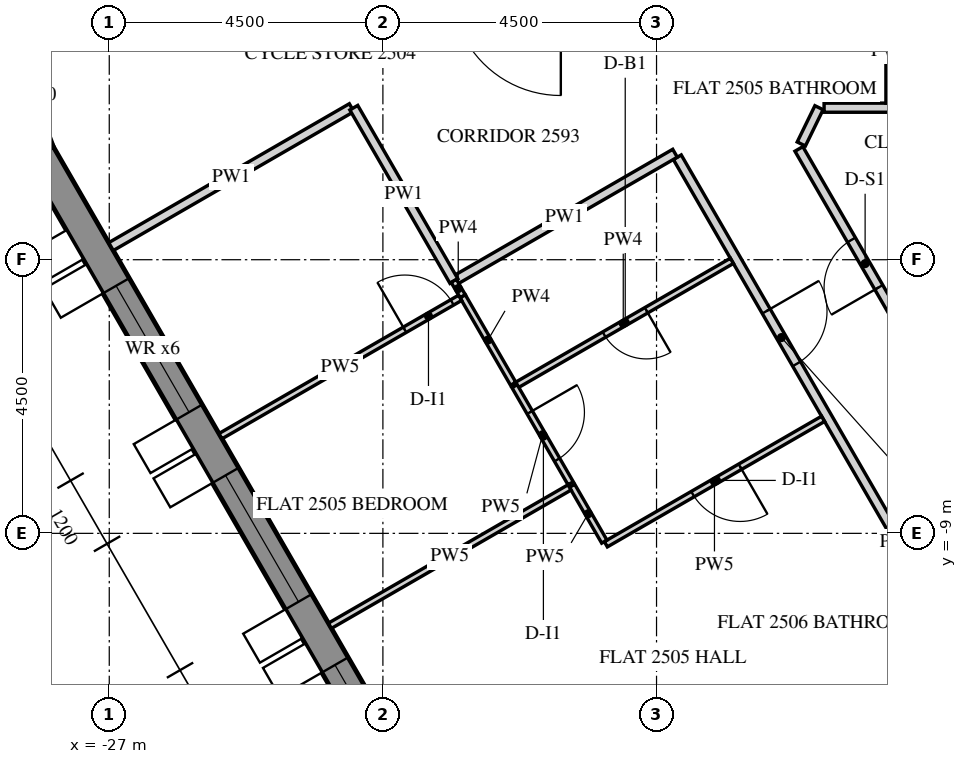
"""IFC4 building model, lengths in metres.
Left out: names, types, materials, properties, quantities, classifications, styles, units other than length and angle.
Written with IfcOpenShell. Run it as: python <this file> out.ifc"""

import sys

from ifc_helpers import new_model, si_unit, direction, frame, frame_2d, origin, place, context, subcontext, project, spatial, polyline, rectangle, outline, extrude, element, fill, save


model = new_model("IFC4")
c1 = context("Model", 3, precision=1e-05, world=origin(), true_north=direction((0.0, 1.0)))
c2 = subcontext(c1, "Body", "Model", "MODEL_VIEW")
j1 = project(units=[si_unit("LENGTHUNIT", "METRE"), si_unit("PLANEANGLEUNIT", "RADIAN")], contexts=[c1])
p1 = place(None, origin())
s1 = spatial("IfcSite", under=j1, at=p1, CompositionType="ELEMENT")
p2 = place(p1, origin())
s2 = spatial("IfcBuilding", under=s1, at=p2, CompositionType="ELEMENT")
p3 = place(p2, frame((0.0, 0.0, 314.7)))
s3 = spatial("IfcBuildingStorey", under=s2, at=p3, CompositionType="ELEMENT", Elevation=314.7)
p4 = place(p3, frame((-28.578, -1.606, -0.15), z_axis=(0.0, 0.0, 1.0), x_axis=(0.352838463023, -0.935684251771, 0.0)))
e1 = element("IfcWall", 1, at=p4, inside=s3, PredefinedType="SOLIDWALL", context=c2, shape_type="SweptSolid", body=[
    extrude(outline(polyline([(-0.041, -0.25), (1.237, -0.25), (1.196, 0.25), (0.041, 0.25), (-0.041, -0.25)])), origin(), (0.0, 0.0, 1.0), 3.9),
])
p5 = place(p3, frame((-28.149, -2.745, -0.15), z_axis=(0.0, 0.0, 1.0), x_axis=(0.500003737743, -0.866023245787, 0.0)))
e2 = element("IfcWall", 2, at=p5, inside=s3, PredefinedType="SOLIDWALL", context=c2, shape_type="SweptSolid", body=[
    extrude(outline(polyline([(-0.021, -0.25), (25.468, -0.25), (25.421, 0.25), (0.021, 0.25), (-0.021, -0.25)])), origin(), (0.0, 0.0, 1.0), 3.9),
])
p6 = place(p5, frame((2.522, 0.0, 0.75)))
e3 = element("IfcOpeningElement", 3, at=p6, cuts=e2, PredefinedType="OPENING", context=c2, shape_type="SweptSolid", body=[
    extrude(rectangle(XDim=2.4, YDim=2.7, at=frame_2d((1.2, 1.35))), frame((0.0, 0.26, 0.0), z_axis=(0.0, -1.0, 0.0), x_axis=(1.0, 0.0, 0.0)), (0.0, 0.0, 1.0), 0.52),
])
p7 = place(p5, frame((6.122, 0.0, 0.75)))
e4 = element("IfcOpeningElement", 4, at=p7, cuts=e2, PredefinedType="OPENING", context=c2, shape_type="SweptSolid", body=[
    extrude(rectangle(XDim=2.4, YDim=2.7, at=frame_2d((1.2, 1.35))), frame((0.0, 0.26, 0.0), z_axis=(0.0, -1.0, 0.0), x_axis=(1.0, 0.0, 0.0)), (0.0, 0.0, 1.0), 0.52),
])
p8 = place(p5, frame((9.722, 0.0, 0.75)))
e5 = element("IfcOpeningElement", 5, at=p8, cuts=e2, PredefinedType="OPENING", context=c2, shape_type="SweptSolid", body=[
    extrude(rectangle(XDim=2.4, YDim=2.7, at=frame_2d((1.2, 1.35))), frame((0.0, 0.26, 0.0), z_axis=(0.0, -1.0, 0.0), x_axis=(1.0, 0.0, 0.0)), (0.0, 0.0, 1.0), 0.52),
])
p9 = place(p5, frame((13.323, 0.0, 0.75)))
e6 = element("IfcOpeningElement", 6, at=p9, cuts=e2, PredefinedType="OPENING", context=c2, shape_type="SweptSolid", body=[
    extrude(rectangle(XDim=2.4, YDim=2.7, at=frame_2d((1.2, 1.35))), frame((0.0, 0.26, 0.0), z_axis=(0.0, -1.0, 0.0), x_axis=(1.0, 0.0, 0.0)), (0.0, 0.0, 1.0), 0.52),
])
p10 = place(p5, frame((16.922, 0.0, 0.75)))
e7 = element("IfcOpeningElement", 7, at=p10, cuts=e2, PredefinedType="OPENING", context=c2, shape_type="SweptSolid", body=[
    extrude(rectangle(XDim=2.4, YDim=2.7, at=frame_2d((1.2, 1.35))), frame((0.0, 0.26, 0.0), z_axis=(0.0, -1.0, 0.0), x_axis=(1.0, 0.0, 0.0)), (0.0, 0.0, 1.0), 0.52),
])
p11 = place(p5, frame((20.522, 0.0, 0.75)))
e8 = element("IfcOpeningElement", 8, at=p11, cuts=e2, PredefinedType="OPENING", context=c2, shape_type="SweptSolid", body=[
    extrude(rectangle(XDim=2.4, YDim=2.7, at=frame_2d((1.2, 1.35))), frame((0.0, 0.26, 0.0), z_axis=(0.0, -1.0, 0.0), x_axis=(1.0, 0.0, 0.0)), (0.0, 0.0, 1.0), 0.52),
])
p12 = place(p3, frame((-17.659, -2.814, 0.0), z_axis=(0.0, 0.0, 1.0), x_axis=(0.499992611149, -0.866029669697, 0.0)))
e9 = element("IfcWall", 9, at=p12, inside=s3, PredefinedType="PARTITIONING", context=c2, shape_type="SweptSolid", body=[
    extrude(rectangle(XDim=14.602, YDim=0.15, at=frame_2d((7.301, 0.0))), origin(), (0.0, 0.0, 1.0), 2.988),
])
p13 = place(p12, frame((2.925, 0.0, 0.0)))
e10 = element("IfcOpeningElement", 10, at=p13, cuts=e9, PredefinedType="OPENING", context=c2, shape_type="SweptSolid", body=[
    extrude(rectangle(XDim=1.0, YDim=2.1, at=frame_2d((0.5, 1.05))), frame((0.0, 0.085, 0.0), z_axis=(0.0, -1.0, 0.0), x_axis=(1.0, 0.0, 0.0)), (0.0, 0.0, 1.0), 0.17),
])
p14 = place(p12, frame((13.452, 0.0, 0.0)))
e11 = element("IfcOpeningElement", 11, at=p14, cuts=e9, PredefinedType="OPENING", context=c2, shape_type="SweptSolid", body=[
    extrude(rectangle(XDim=1.0, YDim=2.1, at=frame_2d((0.5, 1.05))), frame((0.0, 0.085, 0.0), z_axis=(0.0, -1.0, 0.0), x_axis=(1.0, 0.0, 0.0)), (0.0, 0.0, 1.0), 0.17),
])
p15 = place(p3, frame((-21.333, -4.849, 0.0), z_axis=(0.0, 0.0, 1.0), x_axis=(0.866009402589, 0.500027713859, 0.0)))
e12 = element("IfcWall", 12, at=p15, inside=s3, PredefinedType="PARTITIONING", context=c2, shape_type="SweptSolid", body=[
    extrude(rectangle(XDim=4.2, YDim=0.15, at=frame_2d((2.1, 0.0))), origin(), (0.0, 0.0, 1.0), 2.988),
])
p16 = place(p3, frame((-26.971, -4.284, 0.0), z_axis=(0.0, 0.0, 1.0), x_axis=(0.866028083473, 0.499995358614, 0.0)))
e13 = element("IfcWall", 13, at=p16, inside=s3, PredefinedType="PARTITIONING", context=c2, shape_type="SweptSolid", body=[
    extrude(rectangle(XDim=4.569, YDim=0.15, at=frame_2d((2.284, 0.0))), origin(), (0.0, 0.0, 1.0), 2.988),
])
p17 = place(p3, frame((-22.979, -2.0, 0.0), z_axis=(0.0, 0.0, 1.0), x_axis=(0.499989815132, -0.866031283941, 0.0)))
e14 = element("IfcWall", 14, at=p17, inside=s3, PredefinedType="PARTITIONING", context=c2, shape_type="SweptSolid", body=[
    extrude(rectangle(XDim=3.293, YDim=0.15, at=frame_2d((1.647, 0.0))), origin(), (0.0, 0.0, 1.0), 2.988),
])
p18 = place(p3, frame((-13.481, -6.451, 0.0), z_axis=(0.0, 0.0, 1.0), x_axis=(-0.499990905326, 0.866030654533, 0.0)))
e15 = element("IfcWall", 15, at=p18, inside=s3, PredefinedType="PARTITIONING", context=c2, shape_type="SweptSolid", body=[
    extrude(rectangle(XDim=4.356, YDim=0.15, at=frame_2d((2.178, 0.0))), origin(), (0.0, 0.0, 1.0), 2.988),
])
p19 = place(p18, frame((1.728, 0.0, 0.0)))
e16 = element("IfcOpeningElement", 16, at=p19, cuts=e15, PredefinedType="OPENING", context=c2, shape_type="SweptSolid", body=[
    extrude(rectangle(XDim=0.9, YDim=2.1, at=frame_2d((0.45, 1.05))), frame((0.0, 0.085, 0.0), z_axis=(0.0, -1.0, 0.0), x_axis=(1.0, 0.0, 0.0)), (0.0, 0.0, 1.0), 0.17),
])
p20 = place(p3, frame((-15.619, -2.597, 0.0), z_axis=(0.0, 0.0, 1.0), x_axis=(0.438220812173, 0.898867353828, 0.0)))
e17 = element("IfcWall", 17, at=p20, inside=s3, PredefinedType="PARTITIONING", context=c2, shape_type="SweptSolid", body=[
    extrude(rectangle(XDim=0.664, YDim=0.15, at=frame_2d((0.332, 0.0))), origin(), (0.0, 0.0, 1.0), 2.988),
])
p21 = place(p3, frame((-15.245, -2.0, 0.0), z_axis=(0.0, 0.0, 1.0), x_axis=(1.0, 0.0, 0.0)))
e18 = element("IfcWall", 18, at=p21, inside=s3, PredefinedType="PARTITIONING", context=c2, shape_type="SweptSolid", body=[
    extrude(rectangle(XDim=1.092, YDim=0.15, at=frame_2d((0.546, 0.0))), origin(), (0.0, 0.0, 1.0), 2.988),
])
p22 = place(p3, frame((-14.153, -1.925, 0.0), z_axis=(0.0, 0.0, 1.0), x_axis=(0.0, 1.0, 0.0)))
e19 = element("IfcWall", 19, at=p22, inside=s3, PredefinedType="PARTITIONING", context=c2, shape_type="SweptSolid", body=[
    extrude(rectangle(XDim=1.725, YDim=0.15, at=frame_2d((0.863, 0.0))), origin(), (0.0, 0.0, 1.0), 2.988),
])
p23 = place(p3, frame((-15.261, -7.117, 0.0), z_axis=(0.0, 0.0, 1.0), x_axis=(-0.866019999656, -0.500009360108, 0.0)))
e20 = element("IfcWall", 20, at=p23, inside=s3, PredefinedType="PARTITIONING", context=c2, shape_type="SweptSolid", body=[
    extrude(rectangle(XDim=4.125, YDim=0.1, at=frame_2d((2.062, 0.0))), origin(), (0.0, 0.0, 1.0), 2.988),
])
p24 = place(p23, frame((1.575, 0.0, 0.0)))
e21 = element("IfcOpeningElement", 21, at=p24, cuts=e20, PredefinedType="OPENING", context=c2, shape_type="SweptSolid", body=[
    extrude(rectangle(XDim=0.9, YDim=2.1, at=frame_2d((0.45, 1.05))), frame((0.0, 0.06, 0.0), z_axis=(0.0, -1.0, 0.0), x_axis=(1.0, 0.0, 0.0)), (0.0, 0.0, 1.0), 0.12),
])
p25 = place(p3, frame((-18.858, -9.136, 0.0), z_axis=(0.0, 0.0, 1.0), x_axis=(-0.499928435111, 0.86606671785, 0.0)))
e22 = element("IfcWall", 22, at=p25, inside=s3, PredefinedType="PARTITIONING", context=c2, shape_type="SweptSolid", body=[
    extrude(rectangle(XDim=1.06, YDim=0.1, at=frame_2d((0.53, 0.0))), origin(), (0.0, 0.0, 1.0), 2.988),
])
p26 = place(p3, frame((-19.431, -8.245, 0.0), z_axis=(0.0, 0.0, 1.0), x_axis=(-0.866035472144, -0.499982560684, 0.0)))
e23 = element("IfcWall", 23, at=p26, inside=s3, PredefinedType="PARTITIONING", context=c2, shape_type="SweptSolid", body=[
    extrude(rectangle(XDim=4.55, YDim=0.1, at=frame_2d((2.275, 0.0))), origin(), (0.0, 0.0, 1.0), 2.988),
])
p27 = place(p3, frame((-16.761, -4.519, 0.0), z_axis=(0.0, 0.0, 1.0), x_axis=(-0.866019999656, -0.500009360108, 0.0)))
e24 = element("IfcWall", 24, at=p27, inside=s3, PredefinedType="PARTITIONING", context=c2, shape_type="SweptSolid", body=[
    extrude(rectangle(XDim=4.125, YDim=0.1, at=frame_2d((2.062, 0.0))), origin(), (0.0, 0.0, 1.0), 2.988),
])
p28 = place(p27, frame((1.625, 0.0, 0.0)))
e25 = element("IfcOpeningElement", 25, at=p28, cuts=e24, PredefinedType="OPENING", context=c2, shape_type="SweptSolid", body=[
    extrude(rectangle(XDim=0.8, YDim=2.1, at=frame_2d((0.4, 1.05))), frame((0.0, 0.06, 0.0), z_axis=(0.0, -1.0, 0.0), x_axis=(1.0, 0.0, 0.0)), (0.0, 0.0, 1.0), 0.12),
])
p29 = place(p3, frame((-20.334, -6.58, 0.0), z_axis=(0.0, 0.0, 1.0), x_axis=(0.499955500775, -0.8660510939, 0.0)))
e26 = element("IfcWall", 26, at=p29, inside=s3, PredefinedType="PARTITIONING", context=c2, shape_type="SweptSolid", body=[
    extrude(rectangle(XDim=1.844, YDim=0.1, at=frame_2d((0.922, 0.0))), origin(), (0.0, 0.0, 1.0), 2.988),
])
p30 = place(p29, frame((0.498, 0.0, 0.0)))
e27 = element("IfcOpeningElement", 27, at=p30, cuts=e26, PredefinedType="OPENING", context=c2, shape_type="SweptSolid", body=[
    extrude(rectangle(XDim=0.9, YDim=2.1, at=frame_2d((0.45, 1.05))), frame((0.0, 0.06, 0.0), z_axis=(0.0, -1.0, 0.0), x_axis=(1.0, 0.0, 0.0)), (0.0, 0.0, 1.0), 0.12),
])
p31 = place(p3, frame((-21.334, -4.848, 0.0), z_axis=(0.0, 0.0, 1.0), x_axis=(0.500249908544, -0.865881070934, 0.0)))
e28 = element("IfcWall", 28, at=p31, inside=s3, PredefinedType="PARTITIONING", context=c2, shape_type="SweptSolid", body=[
    extrude(rectangle(XDim=0.294, YDim=0.1, at=frame_2d((0.147, 0.0))), origin(), (0.0, 0.0, 1.0), 2.988),
])
p32 = place(p3, frame((-21.188, -5.102, 0.0), z_axis=(0.0, 0.0, 1.0), x_axis=(0.499998264499, -0.866026405774, 0.0)))
e29 = element("IfcWall", 29, at=p32, inside=s3, PredefinedType="PARTITIONING", context=c2, shape_type="SweptSolid", body=[
    extrude(rectangle(XDim=1.66, YDim=0.1, at=frame_2d((0.83, 0.0))), origin(), (0.0, 0.0, 1.0), 2.988),
])
p33 = place(p3, frame((-25.171, -7.402, 0.0), z_axis=(0.0, 0.0, 1.0), x_axis=(0.866022057717, 0.500005795514, 0.0)))
e30 = element("IfcWall", 30, at=p33, inside=s3, PredefinedType="PARTITIONING", context=c2, shape_type="SweptSolid", body=[
    extrude(rectangle(XDim=4.55, YDim=0.1, at=frame_2d((2.275, 0.0))), origin(), (0.0, 0.0, 1.0), 2.988),
])
p34 = place(p33, frame((3.5, 0.0, 0.0)))
e31 = element("IfcOpeningElement", 31, at=p34, cuts=e30, PredefinedType="OPENING", context=c2, shape_type="SweptSolid", body=[
    extrude(rectangle(XDim=0.9, YDim=2.1, at=frame_2d((0.45, 1.05))), frame((0.0, 0.06, 0.0), z_axis=(0.0, -1.0, 0.0), x_axis=(1.0, 0.0, 0.0)), (0.0, 0.0, 1.0), 0.12),
])
p35 = place(p6, frame((0.0, 0.18, 0.0)))
e32 = element("IfcWindow", 32, at=p35, inside=s3, PartitioningType="DOUBLE_PANEL_VERTICAL", PredefinedType="WINDOW", context=c2, shape_type="SweptSolid", body=[
    extrude(rectangle(XDim=2.4, YDim=2.7, at=frame_2d((1.2, 1.35))), frame((0.0, 0.03, 0.0), z_axis=(0.0, -1.0, 0.0), x_axis=(1.0, 0.0, 0.0)), (0.0, 0.0, 1.0), 0.06),
])
fill(e3, e32)
p36 = place(p7, frame((0.0, 0.18, 0.0)))
e33 = element("IfcWindow", 33, at=p36, inside=s3, PartitioningType="DOUBLE_PANEL_VERTICAL", PredefinedType="WINDOW", context=c2, shape_type="SweptSolid", body=[
    extrude(rectangle(XDim=2.4, YDim=2.7, at=frame_2d((1.2, 1.35))), frame((0.0, 0.03, 0.0), z_axis=(0.0, -1.0, 0.0), x_axis=(1.0, 0.0, 0.0)), (0.0, 0.0, 1.0), 0.06),
])
fill(e4, e33)
p37 = place(p8, frame((0.0, 0.18, 0.0)))
e34 = element("IfcWindow", 34, at=p37, inside=s3, PartitioningType="DOUBLE_PANEL_VERTICAL", PredefinedType="WINDOW", context=c2, shape_type="SweptSolid", body=[
    extrude(rectangle(XDim=2.4, YDim=2.7, at=frame_2d((1.2, 1.35))), frame((0.0, 0.03, 0.0), z_axis=(0.0, -1.0, 0.0), x_axis=(1.0, 0.0, 0.0)), (0.0, 0.0, 1.0), 0.06),
])
fill(e5, e34)
p38 = place(p13, origin())
e35 = element("IfcDoor", 35, at=p38, inside=s3, OperationType="SINGLE_SWING_RIGHT", PredefinedType="DOOR", context=c2, shape_type="SweptSolid", body=[
    extrude(rectangle(XDim=1.0, YDim=2.1, at=frame_2d((0.5, 1.05))), frame((0.0, 0.025, 0.0), z_axis=(0.0, -1.0, 0.0), x_axis=(1.0, 0.0, 0.0)), (0.0, 0.0, 1.0), 0.05),
])
fill(e10, e35)
p39 = place(p28, origin())
e36 = element("IfcDoor", 36, at=p39, inside=s3, OperationType="SINGLE_SWING_RIGHT", PredefinedType="DOOR", context=c2, shape_type="SweptSolid", body=[
    extrude(rectangle(XDim=0.8, YDim=2.1, at=frame_2d((0.4, 1.05))), frame((0.0, 0.025, 0.0), z_axis=(0.0, -1.0, 0.0), x_axis=(1.0, 0.0, 0.0)), (0.0, 0.0, 1.0), 0.05),
])
fill(e25, e36)
p40 = place(p24, origin())
e37 = element("IfcDoor", 37, at=p40, inside=s3, OperationType="SINGLE_SWING_RIGHT", PredefinedType="DOOR", context=c2, shape_type="SweptSolid", body=[
    extrude(rectangle(XDim=0.9, YDim=2.1, at=frame_2d((0.45, 1.05))), frame((0.0, 0.025, 0.0), z_axis=(0.0, -1.0, 0.0), x_axis=(1.0, 0.0, 0.0)), (0.0, 0.0, 1.0), 0.05),
])
fill(e21, e37)
p41 = place(p34, origin())
e38 = element("IfcDoor", 38, at=p41, inside=s3, OperationType="SINGLE_SWING_RIGHT", PredefinedType="DOOR", context=c2, shape_type="SweptSolid", body=[
    extrude(rectangle(XDim=0.9, YDim=2.1, at=frame_2d((0.45, 1.05))), frame((0.0, 0.025, 0.0), z_axis=(0.0, -1.0, 0.0), x_axis=(1.0, 0.0, 0.0)), (0.0, 0.0, 1.0), 0.05),
])
fill(e31, e38)
p42 = place(p30, origin())
e39 = element("IfcDoor", 39, at=p42, inside=s3, OperationType="SINGLE_SWING_LEFT", PredefinedType="DOOR", context=c2, shape_type="SweptSolid", body=[
    extrude(rectangle(XDim=0.9, YDim=2.1, at=frame_2d((0.45, 1.05))), frame((0.0, 0.025, 0.0), z_axis=(0.0, -1.0, 0.0), x_axis=(1.0, 0.0, 0.0)), (0.0, 0.0, 1.0), 0.05),
])
fill(e27, e39)
p43 = place(p19, origin())
e40 = element("IfcDoor", 40, at=p43, inside=s3, OperationType="SINGLE_SWING_RIGHT", PredefinedType="DOOR", context=c2, shape_type="SweptSolid", body=[
    extrude(rectangle(XDim=0.9, YDim=2.1, at=frame_2d((0.45, 1.05))), frame((0.0, 0.025, 0.0), z_axis=(0.0, -1.0, 0.0), x_axis=(1.0, 0.0, 0.0)), (0.0, 0.0, 1.0), 0.05),
])
fill(e16, e40)
save(model, sys.argv[1])
